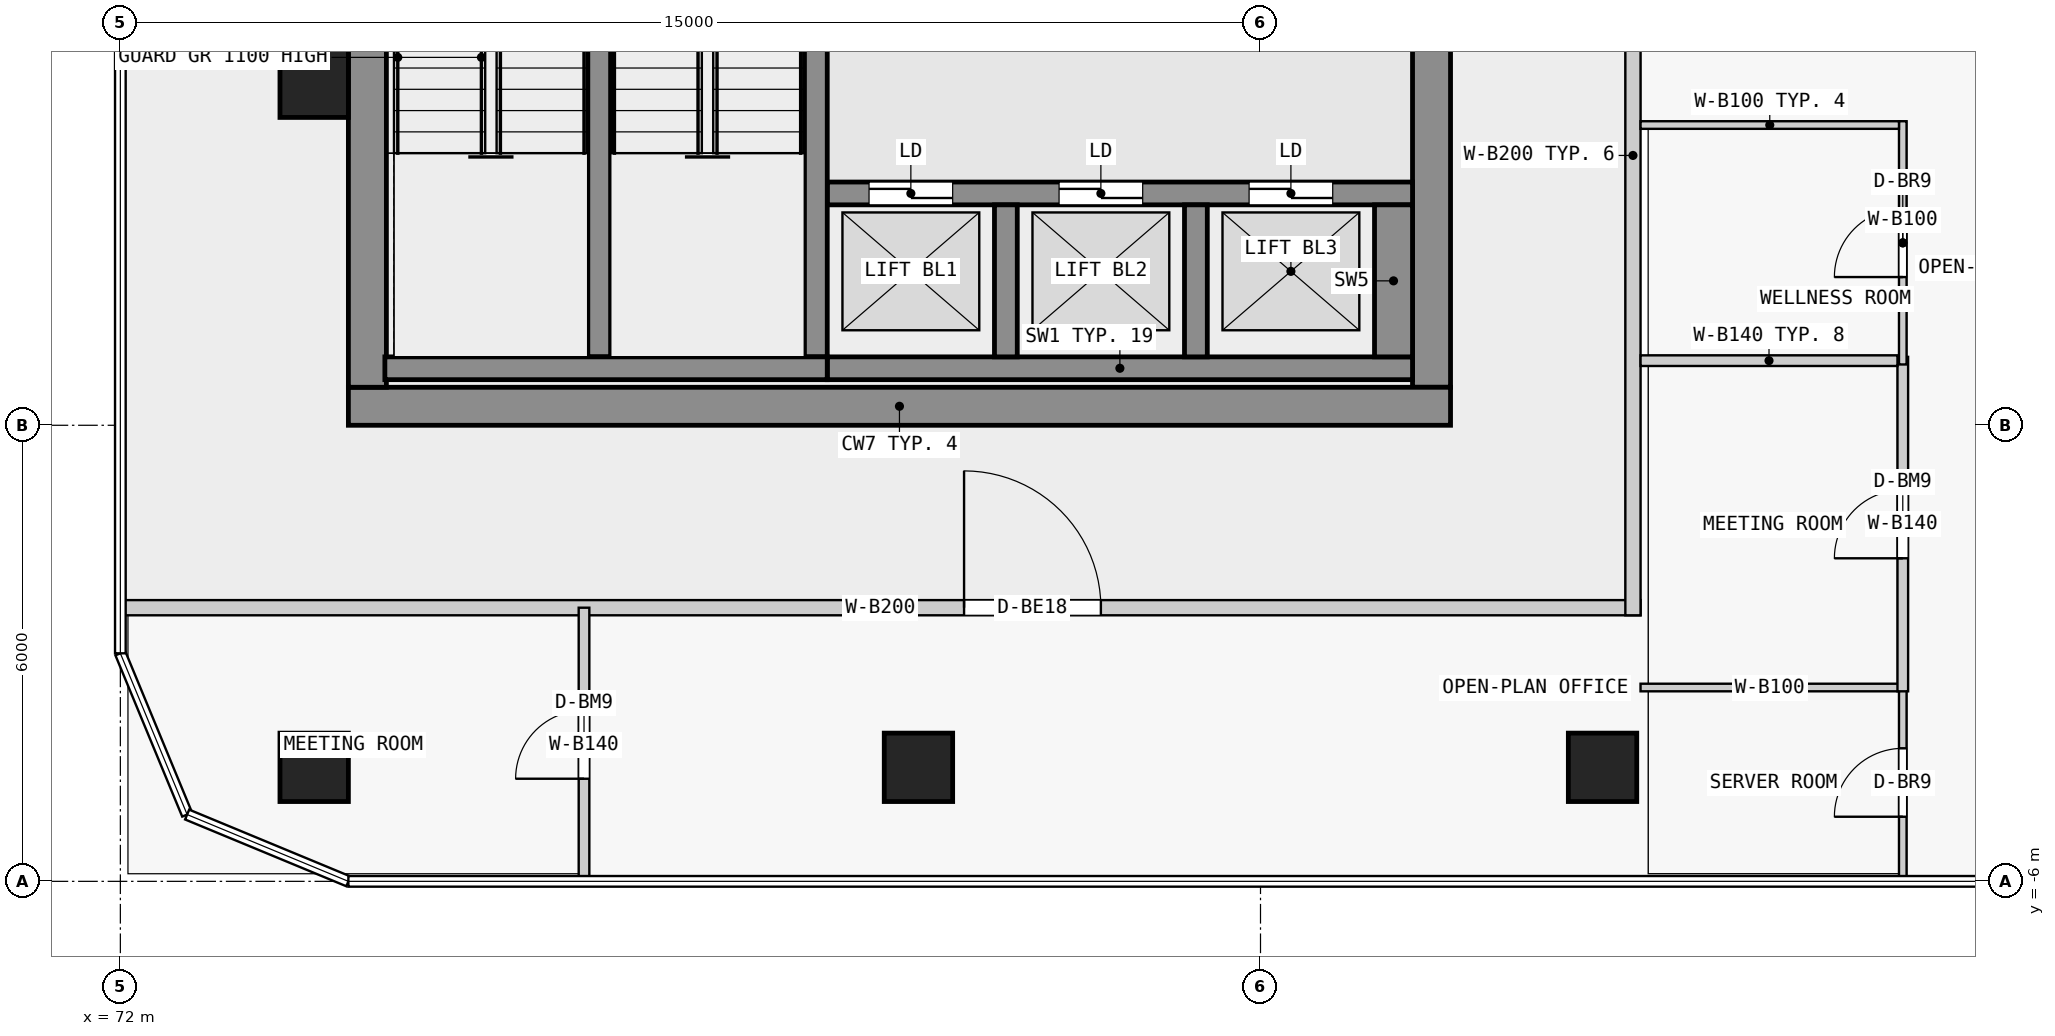
"""IFC4 building model, lengths in metres.
Left out: names, types, materials, properties, quantities, classifications, styles, units other than length and angle.
Written with IfcOpenShell. Run it as: python <this file> out.ifc"""

import sys

from ifc_helpers import new_model, si_unit, direction, frame, frame_2d, origin, origin_2d, place, context, subcontext, project, spatial, rectangle, extrude, element, fill, save


model = new_model("IFC4")
c1 = context("Model", 3, precision=1e-05, world=origin(), true_north=direction((0.0, 1.0)))
c2 = subcontext(c1, "Body", "Model", "MODEL_VIEW")
j1 = project(units=[si_unit("LENGTHUNIT", "METRE"), si_unit("PLANEANGLEUNIT", "RADIAN")], contexts=[c1])
p1 = place(None, origin())
s1 = spatial("IfcSite", under=j1, at=p1, CompositionType="ELEMENT")
p2 = place(p1, origin())
s2 = spatial("IfcBuilding", under=s1, at=p2, CompositionType="ELEMENT")
p3 = place(p2, frame((0.0, 0.0, 40.8)))
s3 = spatial("IfcBuildingStorey", under=s2, at=p3, CompositionType="ELEMENT", Elevation=40.8)
for number, where, z_axis, x_axis in (
    (1, (74.55, -4.5, 0.0), (0.0, 0.0, 1.0), (1.0, 0.0, 0.0)),
    (2, (82.5, -4.5, 0.0), (0.0, 0.0, 1.0), (1.0, 0.0, 0.0)),
    (3, (91.5, -4.5, 0.0), (0.0, 0.0, 1.0), (1.0, 0.0, 0.0)),
    (4, (74.55, 4.5, 0.0), (0.0, 0.0, 1.0), (1.0, 0.0, 0.0)),
):
    element("IfcColumn", number, at=place(p3, frame(where, z_axis=z_axis, x_axis=x_axis)), inside=s3, PredefinedType="COLUMN", context=c2, shape_type="SweptSolid", body=[
        extrude(rectangle(XDim=0.9, YDim=0.9, at=origin_2d()), origin(), (0.0, 0.0, 1.0), 3.5),
    ])
p4 = place(p3, frame((75.0, 0.25, 0.0), z_axis=(0.0, 0.0, 1.0), x_axis=(1.0, 0.0, 0.0)))
e5 = element("IfcWall", 5, at=p4, inside=s3, PredefinedType="SHEAR", context=c2, shape_type="SweptSolid", body=[
    extrude(rectangle(XDim=14.5, YDim=0.5, at=frame_2d((7.25, 0.0))), origin(), (0.0, 0.0, 1.0), 3.25),
])
p5 = place(p3, frame((75.25, 0.5, 0.0), z_axis=(0.0, 0.0, 1.0), x_axis=(0.0, 1.0, 0.0)))
e6 = element("IfcWall", 6, at=p5, inside=s3, PredefinedType="SHEAR", context=c2, shape_type="SweptSolid", body=[
    extrude(rectangle(XDim=17.0, YDim=0.5, at=frame_2d((8.5, 0.0))), origin(), (0.0, 0.0, 1.0), 3.25),
])
p6 = place(p5, frame((7.85, 0.0, 0.0)))
e7 = element("IfcOpeningElement", 7, at=p6, cuts=e6, PredefinedType="OPENING", context=c2, shape_type="SweptSolid", body=[
    extrude(rectangle(XDim=1.8, YDim=2.1, at=frame_2d((0.9, 1.05))), frame((0.0, 0.26, 0.0), z_axis=(0.0, -1.0, 0.0), x_axis=(1.0, 0.0, 0.0)), (0.0, 0.0, 1.0), 0.52),
])
p7 = place(p3, frame((89.25, 0.5, 0.0), z_axis=(0.0, 0.0, 1.0), x_axis=(0.0, 1.0, 0.0)))
e8 = element("IfcWall", 8, at=p7, inside=s3, PredefinedType="SHEAR", context=c2, shape_type="SweptSolid", body=[
    extrude(rectangle(XDim=17.0, YDim=0.5, at=frame_2d((8.5, 0.0))), origin(), (0.0, 0.0, 1.0), 3.25),
])
p8 = place(p7, frame((7.6, 0.0, 0.0)))
e9 = element("IfcOpeningElement", 9, at=p8, cuts=e8, PredefinedType="OPENING", context=c2, shape_type="SweptSolid", body=[
    extrude(rectangle(XDim=1.8, YDim=2.1, at=frame_2d((0.9, 1.05))), frame((0.0, 0.26, 0.0), z_axis=(0.0, -1.0, 0.0), x_axis=(1.0, 0.0, 0.0)), (0.0, 0.0, 1.0), 0.52),
])
p9 = place(p3, frame((75.48, 0.75, 0.0), z_axis=(0.0, 0.0, 1.0), x_axis=(1.0, 0.0, 0.0)))
e10 = element("IfcWall", 10, at=p9, inside=s3, PredefinedType="SHEAR", context=c2, shape_type="SweptSolid", body=[
    extrude(rectangle(XDim=5.82, YDim=0.3, at=frame_2d((2.91, 0.0))), origin(), (0.0, 0.0, 1.0), 3.25),
])
for number, where, z_axis, x_axis in (
    (11, (78.3, 0.9, 0.0), (0.0, 0.0, 1.0), (0.0, 1.0, 0.0)),
    (12, (81.15, 0.9, 0.0), (0.0, 0.0, 1.0), (0.0, 1.0, 0.0)),
):
    element("IfcWall", number, at=place(p3, frame(where, z_axis=z_axis, x_axis=x_axis)), inside=s3, PredefinedType="SHEAR", context=c2, shape_type="SweptSolid", body=[
        extrude(rectangle(XDim=6.4, YDim=0.3, at=frame_2d((3.2, 0.0))), origin(), (0.0, 0.0, 1.0), 3.25),
    ])
p10 = place(p3, frame((81.3, 0.75, 0.0), z_axis=(0.0, 0.0, 1.0), x_axis=(1.0, 0.0, 0.0)))
e13 = element("IfcWall", 13, at=p10, inside=s3, PredefinedType="SHEAR", context=c2, shape_type="SweptSolid", body=[
    extrude(rectangle(XDim=7.7, YDim=0.3, at=frame_2d((3.85, 0.0))), origin(), (0.0, 0.0, 1.0), 3.25),
])
for number, where, z_axis, x_axis in (
    (14, (83.65, 0.9, 0.0), (0.0, 0.0, 1.0), (0.0, 1.0, 0.0)),
    (15, (86.15, 0.9, 0.0), (0.0, 0.0, 1.0), (0.0, 1.0, 0.0)),
):
    element("IfcWall", number, at=place(p3, frame(where, z_axis=z_axis, x_axis=x_axis)), inside=s3, PredefinedType="SHEAR", context=c2, shape_type="SweptSolid", body=[
        extrude(rectangle(XDim=2.0, YDim=0.3, at=frame_2d((1.0, 0.0))), origin(), (0.0, 0.0, 1.0), 3.25),
    ])
p11 = place(p3, frame((88.75, 0.9, 0.0), z_axis=(0.0, 0.0, 1.0), x_axis=(0.0, 1.0, 0.0)))
e16 = element("IfcWall", 16, at=p11, inside=s3, PredefinedType="SHEAR", context=c2, shape_type="SweptSolid", body=[
    extrude(rectangle(XDim=2.0, YDim=0.5, at=frame_2d((1.0, 0.0))), origin(), (0.0, 0.0, 1.0), 3.25),
])
p12 = place(p3, frame((81.3, 3.05, 0.0), z_axis=(0.0, 0.0, 1.0), x_axis=(1.0, 0.0, 0.0)))
e17 = element("IfcWall", 17, at=p12, inside=s3, PredefinedType="SHEAR", context=c2, shape_type="SweptSolid", body=[
    extrude(rectangle(XDim=7.7, YDim=0.3, at=frame_2d((3.85, 0.0))), origin(), (0.0, 0.0, 1.0), 3.25),
])
p13 = place(p12, frame((0.55, 0.0, 0.0)))
e18 = element("IfcOpeningElement", 18, at=p13, cuts=e17, PredefinedType="OPENING", context=c2, shape_type="SweptSolid", body=[
    extrude(rectangle(XDim=1.1, YDim=2.1, at=frame_2d((0.55, 1.05))), frame((0.0, 0.16, 0.0), z_axis=(0.0, -1.0, 0.0), x_axis=(1.0, 0.0, 0.0)), (0.0, 0.0, 1.0), 0.32),
])
p14 = place(p12, frame((3.05, 0.0, 0.0)))
e19 = element("IfcOpeningElement", 19, at=p14, cuts=e17, PredefinedType="OPENING", context=c2, shape_type="SweptSolid", body=[
    extrude(rectangle(XDim=1.1, YDim=2.1, at=frame_2d((0.55, 1.05))), frame((0.0, 0.16, 0.0), z_axis=(0.0, -1.0, 0.0), x_axis=(1.0, 0.0, 0.0)), (0.0, 0.0, 1.0), 0.32),
])
p15 = place(p12, frame((5.55, 0.0, 0.0)))
e20 = element("IfcOpeningElement", 20, at=p15, cuts=e17, PredefinedType="OPENING", context=c2, shape_type="SweptSolid", body=[
    extrude(rectangle(XDim=1.1, YDim=2.1, at=frame_2d((0.55, 1.05))), frame((0.0, 0.16, 0.0), z_axis=(0.0, -1.0, 0.0), x_axis=(1.0, 0.0, 0.0)), (0.0, 0.0, 1.0), 0.32),
])
p16 = place(p3, frame((72.0, -2.4, 0.0), z_axis=(0.0, 0.0, 1.0), x_axis=(1.0, 0.0, 0.0)))
e21 = element("IfcWall", 21, at=p16, inside=s3, PredefinedType="PARTITIONING", context=c2, shape_type="SweptSolid", body=[
    extrude(rectangle(XDim=20.0, YDim=0.2, at=frame_2d((10.0, 0.0))), origin(), (0.0, 0.0, 1.0), 3.25),
])
p17 = place(p16, frame((11.1, 0.0, 0.0)))
e22 = element("IfcOpeningElement", 22, at=p17, cuts=e21, PredefinedType="OPENING", context=c2, shape_type="SweptSolid", body=[
    extrude(rectangle(XDim=1.8, YDim=2.1, at=frame_2d((0.9, 1.05))), frame((0.0, 0.11, 0.0), z_axis=(0.0, -1.0, 0.0), x_axis=(1.0, 0.0, 0.0)), (0.0, 0.0, 1.0), 0.22),
])
p18 = place(p3, frame((91.9, -2.5, 0.0), z_axis=(0.0, 0.0, 1.0), x_axis=(0.0, 1.0, 0.0)))
e23 = element("IfcWall", 23, at=p18, inside=s3, PredefinedType="PARTITIONING", context=c2, shape_type="SweptSolid", body=[
    extrude(rectangle(XDim=12.1, YDim=0.2, at=frame_2d((6.05, 0.0))), origin(), (0.0, 0.0, 1.0), 3.25),
])
p19 = place(p3, frame((78.1, -6.0, 0.0), z_axis=(0.0, 0.0, 1.0), x_axis=(0.0, 1.0, 0.0)))
e24 = element("IfcWall", 24, at=p19, inside=s3, PredefinedType="PARTITIONING", context=c2, shape_type="SweptSolid", body=[
    extrude(rectangle(XDim=3.6, YDim=0.14, at=frame_2d((1.8, 0.0))), origin(), (0.0, 0.0, 1.0), 3.25),
])
p20 = place(p19, frame((1.35, 0.0, 0.0)))
e25 = element("IfcOpeningElement", 25, at=p20, cuts=e24, PredefinedType="OPENING", context=c2, shape_type="SweptSolid", body=[
    extrude(rectangle(XDim=0.9, YDim=2.4, at=frame_2d((0.45, 1.2))), frame((0.0, 0.08, 0.0), z_axis=(0.0, -1.0, 0.0), x_axis=(1.0, 0.0, 0.0)), (0.0, 0.0, 1.0), 0.16),
])
p21 = place(p3, frame((95.45, -6.0, 0.0), z_axis=(0.0, 0.0, 1.0), x_axis=(0.0, 1.0, 0.0)))
e26 = element("IfcWall", 26, at=p21, inside=s3, PredefinedType="PARTITIONING", context=c2, shape_type="SweptSolid", body=[
    extrude(rectangle(XDim=2.6, YDim=0.1, at=frame_2d((1.3, 0.0))), origin(), (0.0, 0.0, 1.0), 3.25),
])
p22 = place(p21, frame((0.85, 0.0, 0.0)))
e27 = element("IfcOpeningElement", 27, at=p22, cuts=e26, PredefinedType="OPENING", context=c2, shape_type="SweptSolid", body=[
    extrude(rectangle(XDim=0.9, YDim=2.1, at=frame_2d((0.45, 1.05))), frame((0.0, 0.06, 0.0), z_axis=(0.0, -1.0, 0.0), x_axis=(1.0, 0.0, 0.0)), (0.0, 0.0, 1.0), 0.12),
])
p23 = place(p3, frame((92.0, -3.45, 0.0), z_axis=(0.0, 0.0, 1.0), x_axis=(1.0, 0.0, 0.0)))
e28 = element("IfcWall", 28, at=p23, inside=s3, PredefinedType="PARTITIONING", context=c2, shape_type="SweptSolid", body=[
    extrude(rectangle(XDim=3.4, YDim=0.1, at=frame_2d((1.7, 0.0))), origin(), (0.0, 0.0, 1.0), 3.25),
])
p24 = place(p3, frame((95.45, -3.5, 0.0), z_axis=(0.0, 0.0, 1.0), x_axis=(0.0, 1.0, 0.0)))
e29 = element("IfcWall", 29, at=p24, inside=s3, PredefinedType="PARTITIONING", context=c2, shape_type="SweptSolid", body=[
    extrude(rectangle(XDim=4.4, YDim=0.14, at=frame_2d((2.2, 0.0))), origin(), (0.0, 0.0, 1.0), 3.25),
])
p25 = place(p24, frame((1.75, 0.0, 0.0)))
e30 = element("IfcOpeningElement", 30, at=p25, cuts=e29, PredefinedType="OPENING", context=c2, shape_type="SweptSolid", body=[
    extrude(rectangle(XDim=0.9, YDim=2.4, at=frame_2d((0.45, 1.2))), frame((0.0, 0.08, 0.0), z_axis=(0.0, -1.0, 0.0), x_axis=(1.0, 0.0, 0.0)), (0.0, 0.0, 1.0), 0.16),
])
p26 = place(p3, frame((92.0, 0.85, 0.0), z_axis=(0.0, 0.0, 1.0), x_axis=(1.0, 0.0, 0.0)))
e31 = element("IfcWall", 31, at=p26, inside=s3, PredefinedType="PARTITIONING", context=c2, shape_type="SweptSolid", body=[
    extrude(rectangle(XDim=3.38, YDim=0.14, at=frame_2d((1.69, 0.0))), origin(), (0.0, 0.0, 1.0), 3.25),
])
p27 = place(p3, frame((95.45, 0.8, 0.0), z_axis=(0.0, 0.0, 1.0), x_axis=(0.0, 1.0, 0.0)))
e32 = element("IfcWall", 32, at=p27, inside=s3, PredefinedType="PARTITIONING", context=c2, shape_type="SweptSolid", body=[
    extrude(rectangle(XDim=3.2, YDim=0.1, at=frame_2d((1.6, 0.0))), origin(), (0.0, 0.0, 1.0), 3.25),
])
p28 = place(p27, frame((1.15, 0.0, 0.0)))
e33 = element("IfcOpeningElement", 33, at=p28, cuts=e32, PredefinedType="OPENING", context=c2, shape_type="SweptSolid", body=[
    extrude(rectangle(XDim=0.9, YDim=2.1, at=frame_2d((0.45, 1.05))), frame((0.0, 0.06, 0.0), z_axis=(0.0, -1.0, 0.0), x_axis=(1.0, 0.0, 0.0)), (0.0, 0.0, 1.0), 0.12),
])
p29 = place(p3, frame((92.0, 3.95, 0.0), z_axis=(0.0, 0.0, 1.0), x_axis=(1.0, 0.0, 0.0)))
e34 = element("IfcWall", 34, at=p29, inside=s3, PredefinedType="PARTITIONING", context=c2, shape_type="SweptSolid", body=[
    extrude(rectangle(XDim=3.4, YDim=0.1, at=frame_2d((1.7, 0.0))), origin(), (0.0, 0.0, 1.0), 3.25),
])
p30 = place(p13, origin())
e35 = element("IfcDoor", 35, at=p30, inside=s3, OperationType="DOUBLE_DOOR_SLIDING", PredefinedType="DOOR", context=c2, shape_type="SweptSolid", body=[
    extrude(rectangle(XDim=1.1, YDim=2.1, at=frame_2d((0.55, 1.05))), frame((0.0, 0.025, 0.0), z_axis=(0.0, -1.0, 0.0), x_axis=(1.0, 0.0, 0.0)), (0.0, 0.0, 1.0), 0.05),
])
fill(e18, e35)
p31 = place(p14, origin())
e36 = element("IfcDoor", 36, at=p31, inside=s3, OperationType="DOUBLE_DOOR_SLIDING", PredefinedType="DOOR", context=c2, shape_type="SweptSolid", body=[
    extrude(rectangle(XDim=1.1, YDim=2.1, at=frame_2d((0.55, 1.05))), frame((0.0, 0.025, 0.0), z_axis=(0.0, -1.0, 0.0), x_axis=(1.0, 0.0, 0.0)), (0.0, 0.0, 1.0), 0.05),
])
fill(e19, e36)
p32 = place(p15, origin())
e37 = element("IfcDoor", 37, at=p32, inside=s3, OperationType="DOUBLE_DOOR_SLIDING", PredefinedType="DOOR", context=c2, shape_type="SweptSolid", body=[
    extrude(rectangle(XDim=1.1, YDim=2.1, at=frame_2d((0.55, 1.05))), frame((0.0, 0.025, 0.0), z_axis=(0.0, -1.0, 0.0), x_axis=(1.0, 0.0, 0.0)), (0.0, 0.0, 1.0), 0.05),
])
fill(e20, e37)
p33 = place(p17, origin())
e38 = element("IfcDoor", 38, at=p33, inside=s3, OperationType="DOUBLE_DOOR_SINGLE_SWING", PredefinedType="DOOR", context=c2, shape_type="SweptSolid", body=[
    extrude(rectangle(XDim=1.8, YDim=2.1, at=frame_2d((0.9, 1.05))), frame((0.0, 0.025, 0.0), z_axis=(0.0, -1.0, 0.0), x_axis=(1.0, 0.0, 0.0)), (0.0, 0.0, 1.0), 0.05),
])
fill(e22, e38)
p34 = place(p20, origin())
e39 = element("IfcDoor", 39, at=p34, inside=s3, OperationType="SINGLE_SWING_LEFT", PredefinedType="DOOR", context=c2, shape_type="SweptSolid", body=[
    extrude(rectangle(XDim=0.9, YDim=2.4, at=frame_2d((0.45, 1.2))), frame((0.0, 0.025, 0.0), z_axis=(0.0, -1.0, 0.0), x_axis=(1.0, 0.0, 0.0)), (0.0, 0.0, 1.0), 0.05),
])
fill(e25, e39)
p35 = place(p22, origin())
e40 = element("IfcDoor", 40, at=p35, inside=s3, OperationType="SINGLE_SWING_LEFT", PredefinedType="DOOR", context=c2, shape_type="SweptSolid", body=[
    extrude(rectangle(XDim=0.9, YDim=2.1, at=frame_2d((0.45, 1.05))), frame((0.0, 0.025, 0.0), z_axis=(0.0, -1.0, 0.0), x_axis=(1.0, 0.0, 0.0)), (0.0, 0.0, 1.0), 0.05),
])
fill(e27, e40)
p36 = place(p25, origin())
e41 = element("IfcDoor", 41, at=p36, inside=s3, OperationType="SINGLE_SWING_LEFT", PredefinedType="DOOR", context=c2, shape_type="SweptSolid", body=[
    extrude(rectangle(XDim=0.9, YDim=2.4, at=frame_2d((0.45, 1.2))), frame((0.0, 0.025, 0.0), z_axis=(0.0, -1.0, 0.0), x_axis=(1.0, 0.0, 0.0)), (0.0, 0.0, 1.0), 0.05),
])
fill(e30, e41)
p37 = place(p28, origin())
e42 = element("IfcDoor", 42, at=p37, inside=s3, OperationType="SINGLE_SWING_LEFT", PredefinedType="DOOR", context=c2, shape_type="SweptSolid", body=[
    extrude(rectangle(XDim=0.9, YDim=2.1, at=frame_2d((0.45, 1.05))), frame((0.0, 0.025, 0.0), z_axis=(0.0, -1.0, 0.0), x_axis=(1.0, 0.0, 0.0)), (0.0, 0.0, 1.0), 0.05),
])
fill(e33, e42)
save(model, sys.argv[1])
